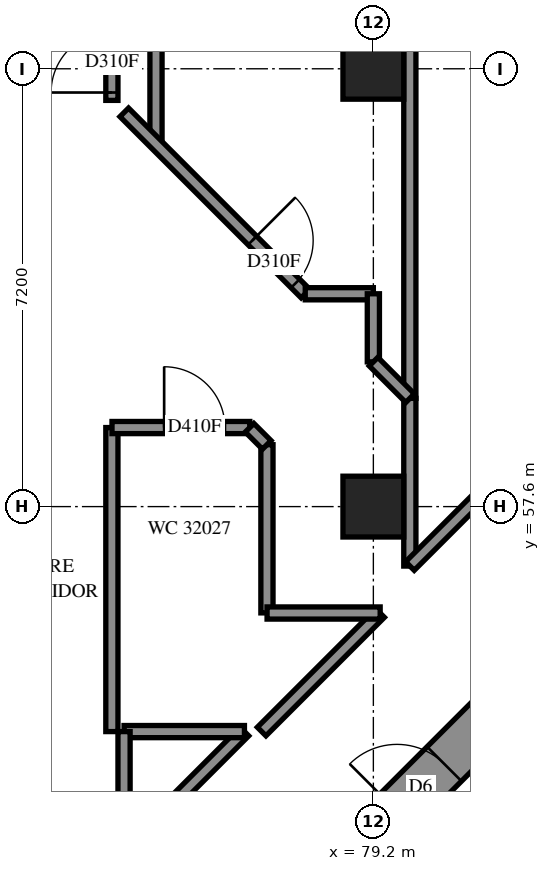
"""IFC4 building model, lengths in metres.
Left out: names, types, materials, properties, quantities, classifications, styles, units other than length and angle.
Written with IfcOpenShell. Run it as: python <this file> out.ifc"""

import sys

from ifc_helpers import new_model, si_unit, direction, frame, frame_2d, origin, origin_2d, place, context, subcontext, project, spatial, rectangle, extrude, element, fill, save


model = new_model("IFC4")
c1 = context("Model", 3, precision=1e-05, world=origin(), true_north=direction((0.0, 1.0)))
c2 = subcontext(c1, "Body", "Model", "MODEL_VIEW")
j1 = project(units=[si_unit("LENGTHUNIT", "METRE"), si_unit("PLANEANGLEUNIT", "RADIAN")], contexts=[c1])
p1 = place(None, origin())
s1 = spatial("IfcSite", under=j1, at=p1, CompositionType="ELEMENT")
p2 = place(p1, origin())
s2 = spatial("IfcBuilding", under=s1, at=p2, CompositionType="ELEMENT")
p3 = place(p2, frame((0.0, 0.0, 118.6)))
s3 = spatial("IfcBuildingStorey", under=s2, at=p3, CompositionType="ELEMENT", Elevation=118.6)
for number, where, z_axis, x_axis in (
    (1, (79.2, 57.6, 0.0), (0.0, 0.0, 1.0), (1.0, 0.0, 0.0)),
    (2, (79.2, 64.8, 0.0), (0.0, 0.0, 1.0), (1.0, 0.0, 0.0)),
):
    element("IfcColumn", number, at=place(p3, frame(where, z_axis=z_axis, x_axis=x_axis)), inside=s3, PredefinedType="COLUMN", context=c2, shape_type="SweptSolid", body=[
        extrude(rectangle(XDim=1.0, YDim=1.0, at=origin_2d()), origin(), (0.0, 0.0, 1.0), 3.1),
    ])
p4 = place(p3, frame((76.372, 49.373, -0.3), z_axis=(0.0, 0.0, 1.0), x_axis=(0.7071067812, 0.7071067812, 0.0)))
e3 = element("IfcWall", 3, at=p4, inside=s3, PredefinedType="SHEAR", context=c2, shape_type="SweptSolid", body=[
    extrude(rectangle(XDim=14.4, YDim=0.8, at=frame_2d((7.2, 0.0))), origin(), (0.0, 0.0, 1.0), 2.7),
])
p5 = place(p4, frame((4.55, 0.0, 0.3)))
e4 = element("IfcOpeningElement", 4, at=p5, cuts=e3, PredefinedType="OPENING", context=c2, shape_type="SweptSolid", body=[
    extrude(rectangle(XDim=1.1, YDim=2.1, at=frame_2d((0.55, 1.05))), frame((0.0, 0.41, 0.0), z_axis=(0.0, -1.0, 0.0), x_axis=(1.0, 0.0, 0.0)), (0.0, 0.0, 1.0), 0.82),
])
p6 = place(p4, frame((11.35, 0.0, 0.3)))
e5 = element("IfcOpeningElement", 5, at=p6, cuts=e3, PredefinedType="OPENING", context=c2, shape_type="SweptSolid", body=[
    extrude(rectangle(XDim=1.1, YDim=2.1, at=frame_2d((0.55, 1.05))), frame((0.0, 0.41, 0.0), z_axis=(0.0, -1.0, 0.0), x_axis=(1.0, 0.0, 0.0)), (0.0, 0.0, 1.0), 0.82),
])
p7 = place(p3, frame((79.8, 59.38, 0.0), z_axis=(0.0, 0.0, 1.0), x_axis=(0.0, 1.0, 0.0)))
e6 = element("IfcWall", 6, at=p7, inside=s3, PredefinedType="PARTITIONING", context=c2, shape_type="SweptSolid", body=[
    extrude(rectangle(XDim=13.62, YDim=0.2, at=frame_2d((6.81, 0.0))), origin(), (0.0, 0.0, 1.0), 3.1),
])
p8 = place(p3, frame((75.625, 63.562, 0.0), z_axis=(0.0, 0.0, 1.0), x_axis=(0.0, 1.0, 0.0)))
e7 = element("IfcWall", 7, at=p8, inside=s3, PredefinedType="PARTITIONING", context=c2, shape_type="SweptSolid", body=[
    extrude(rectangle(XDim=9.208, YDim=0.2, at=frame_2d((4.604, 0.0))), origin(), (0.0, 0.0, 1.0), 3.1),
])
p9 = place(p3, frame((74.9, 53.9, 0.0), z_axis=(0.0, 0.0, 1.0), x_axis=(0.0, 1.0, 0.0)))
e8 = element("IfcWall", 8, at=p9, inside=s3, PredefinedType="PARTITIONING", context=c2, shape_type="SweptSolid", body=[
    extrude(rectangle(XDim=5.0, YDim=0.2, at=frame_2d((2.5, 0.0))), origin(), (0.0, 0.0, 1.0), 3.1),
])
p10 = place(p3, frame((75.103, 64.083, 0.0), z_axis=(0.0, 0.0, 1.0), x_axis=(0.7071067812, -0.7071067812, 0.0)))
e9 = element("IfcWall", 9, at=p10, inside=s3, PredefinedType="PARTITIONING", context=c2, shape_type="SweptSolid", body=[
    extrude(rectangle(XDim=4.214, YDim=0.2, at=frame_2d((2.107, 0.0))), origin(), (0.0, 0.0, 1.0), 3.1),
])
p11 = place(p10, frame((2.979, 0.0, 0.0)))
e10 = element("IfcOpeningElement", 10, at=p11, cuts=e9, PredefinedType="OPENING", context=c2, shape_type="SweptSolid", body=[
    extrude(rectangle(XDim=1.0, YDim=2.1, at=frame_2d((0.5, 1.05))), frame((0.0, 0.11, 0.0), z_axis=(0.0, -1.0, 0.0), x_axis=(1.0, 0.0, 0.0)), (0.0, 0.0, 1.0), 0.22),
])
p12 = place(p3, frame((74.9, 64.28, 0.0), z_axis=(0.0, 0.0, 1.0), x_axis=(0.0, 1.0, 0.0)))
e11 = element("IfcWall", 11, at=p12, inside=s3, PredefinedType="PARTITIONING", context=c2, shape_type="SweptSolid", body=[
    extrude(rectangle(XDim=3.42, YDim=0.2, at=frame_2d((1.71, 0.0))), origin(), (0.0, 0.0, 1.0), 3.1),
])
p13 = place(p12, frame((0.13, 0.0, 0.0)))
e12 = element("IfcOpeningElement", 12, at=p13, cuts=e11, PredefinedType="OPENING", context=c2, shape_type="SweptSolid", body=[
    extrude(rectangle(XDim=1.0, YDim=2.1, at=frame_2d((0.5, 1.05))), frame((0.0, 0.11, 0.0), z_axis=(0.0, -1.0, 0.0), x_axis=(1.0, 0.0, 0.0)), (0.0, 0.0, 1.0), 0.22),
])
p14 = place(p3, frame((75.102, 51.922, 0.0), z_axis=(0.0, 0.0, 1.0), x_axis=(0.7071067812, 0.7071067812, 0.0)))
e13 = element("IfcWall", 13, at=p14, inside=s3, PredefinedType="PARTITIONING", context=c2, shape_type="SweptSolid", body=[
    extrude(rectangle(XDim=2.797, YDim=0.2, at=frame_2d((1.399, 0.0))), origin(), (0.0, 0.0, 1.0), 3.1),
])
p15 = place(p3, frame((77.45, 55.852, 0.0), z_axis=(0.0, 0.0, 1.0), x_axis=(0.0, 1.0, 0.0)))
e14 = element("IfcWall", 14, at=p15, inside=s3, PredefinedType="PARTITIONING", context=c2, shape_type="SweptSolid", body=[
    extrude(rectangle(XDim=2.766, YDim=0.2, at=frame_2d((1.383, 0.0))), origin(), (0.0, 0.0, 1.0), 3.1),
])
p16 = place(p3, frame((79.8, 56.622, 0.0), z_axis=(0.0, 0.0, 1.0), x_axis=(0.0, 1.0, 0.0)))
e15 = element("IfcWall", 15, at=p16, inside=s3, PredefinedType="PARTITIONING", context=c2, shape_type="SweptSolid", body=[
    extrude(rectangle(XDim=2.758, YDim=0.2, at=frame_2d((1.379, 0.0))), origin(), (0.0, 0.0, 1.0), 3.1),
])
p17 = place(p3, frame((77.363, 53.901, 0.0), z_axis=(0.0, 0.0, 1.0), x_axis=(0.7071067812, 0.7071067812, 0.0)))
e16 = element("IfcWall", 16, at=p17, inside=s3, PredefinedType="PARTITIONING", context=c2, shape_type="SweptSolid", body=[
    extrude(rectangle(XDim=2.755, YDim=0.2, at=frame_2d((1.377, 0.0))), origin(), (0.0, 0.0, 1.0), 3.1),
])
p18 = place(p3, frame((74.902, 58.9, 0.0), z_axis=(0.0, 0.0, 1.0), x_axis=(1.0, 0.0, 0.0)))
e17 = element("IfcWall", 17, at=p18, inside=s3, PredefinedType="PARTITIONING", context=c2, shape_type="SweptSolid", body=[
    extrude(rectangle(XDim=2.266, YDim=0.2, at=frame_2d((1.133, 0.0))), origin(), (0.0, 0.0, 1.0), 3.1),
])
p19 = place(p18, frame((0.858, 0.0, 0.0)))
e18 = element("IfcOpeningElement", 18, at=p19, cuts=e17, PredefinedType="OPENING", context=c2, shape_type="SweptSolid", body=[
    extrude(rectangle(XDim=1.0, YDim=2.1, at=frame_2d((0.5, 1.05))), frame((0.0, 0.11, 0.0), z_axis=(0.0, -1.0, 0.0), x_axis=(1.0, 0.0, 0.0)), (0.0, 0.0, 1.0), 0.22),
])
p20 = place(p3, frame((75.1, 53.9, 0.0), z_axis=(0.0, 0.0, 1.0), x_axis=(1.0, 0.0, 0.0)))
e19 = element("IfcWall", 19, at=p20, inside=s3, PredefinedType="PARTITIONING", context=c2, shape_type="SweptSolid", body=[
    extrude(rectangle(XDim=1.98, YDim=0.2, at=frame_2d((0.99, 0.0))), origin(), (0.0, 0.0, 1.0), 3.1),
])
p21 = place(p3, frame((75.1, 51.922, 0.0), z_axis=(0.0, 0.0, 1.0), x_axis=(0.0, 1.0, 0.0)))
e20 = element("IfcWall", 20, at=p21, inside=s3, PredefinedType="PARTITIONING", context=c2, shape_type="SweptSolid", body=[
    extrude(rectangle(XDim=1.978, YDim=0.2, at=frame_2d((0.989, 0.0))), origin(), (0.0, 0.0, 1.0), 3.1),
])
p22 = place(p3, frame((79.802, 56.623, 0.0), z_axis=(0.0, 0.0, 1.0), x_axis=(0.7071067812, 0.7071067812, 0.0)))
e21 = element("IfcWall", 21, at=p22, inside=s3, PredefinedType="PARTITIONING", context=c2, shape_type="SweptSolid", body=[
    extrude(rectangle(XDim=1.949, YDim=0.2, at=frame_2d((0.974, 0.0))), origin(), (0.0, 0.0, 1.0), 3.1),
])
p23 = place(p3, frame((77.452, 55.85, 0.0), z_axis=(0.0, 0.0, 1.0), x_axis=(1.0, 0.0, 0.0)))
e22 = element("IfcWall", 22, at=p23, inside=s3, PredefinedType="PARTITIONING", context=c2, shape_type="SweptSolid", body=[
    extrude(rectangle(XDim=1.86, YDim=0.2, at=frame_2d((0.93, 0.0))), origin(), (0.0, 0.0, 1.0), 3.1),
])
for number, where, z_axis, x_axis in (
    (23, (78.08, 61.1, 0.0), (0.0, 0.0, 1.0), (1.0, 0.0, 0.0)),
    (24, (79.2, 59.98, 0.0), (0.0, 0.0, 1.0), (0.0, 1.0, 0.0)),
):
    element("IfcWall", number, at=place(p3, frame(where, z_axis=z_axis, x_axis=x_axis)), inside=s3, PredefinedType="PARTITIONING", context=c2, shape_type="SweptSolid", body=[
        extrude(rectangle(XDim=1.12, YDim=0.2, at=frame_2d((0.56, 0.0))), origin(), (0.0, 0.0, 1.0), 3.1),
    ])
p24 = place(p3, frame((79.203, 59.983, 0.0), z_axis=(0.0, 0.0, 1.0), x_axis=(0.7071067812, -0.7071067812, 0.0)))
e25 = element("IfcWall", 25, at=p24, inside=s3, PredefinedType="PARTITIONING", context=c2, shape_type="SweptSolid", body=[
    extrude(rectangle(XDim=0.849, YDim=0.2, at=frame_2d((0.424, 0.0))), origin(), (0.0, 0.0, 1.0), 3.1),
])
p25 = place(p3, frame((77.165, 58.897, 0.0), z_axis=(0.0, 0.0, 1.0), x_axis=(0.7071067812, -0.7071067812, 0.0)))
e26 = element("IfcWall", 26, at=p25, inside=s3, PredefinedType="PARTITIONING", context=c2, shape_type="SweptSolid", body=[
    extrude(rectangle(XDim=0.399, YDim=0.2, at=frame_2d((0.199, 0.0))), origin(), (0.0, 0.0, 1.0), 3.1),
])
p26 = place(p5, origin())
e27 = element("IfcDoor", 27, at=p26, inside=s3, OperationType="DOUBLE_DOOR_SINGLE_SWING", PredefinedType="DOOR", context=c2, shape_type="SweptSolid", body=[
    extrude(rectangle(XDim=1.1, YDim=2.1, at=frame_2d((0.55, 1.05))), frame((0.0, 0.025, 0.0), z_axis=(0.0, -1.0, 0.0), x_axis=(1.0, 0.0, 0.0)), (0.0, 0.0, 1.0), 0.05),
])
fill(e4, e27)
p27 = place(p19, origin())
e28 = element("IfcDoor", 28, at=p27, inside=s3, OperationType="SINGLE_SWING_RIGHT", PredefinedType="DOOR", context=c2, shape_type="SweptSolid", body=[
    extrude(rectangle(XDim=1.0, YDim=2.1, at=frame_2d((0.5, 1.05))), frame((0.0, 0.025, 0.0), z_axis=(0.0, -1.0, 0.0), x_axis=(1.0, 0.0, 0.0)), (0.0, 0.0, 1.0), 0.05),
])
fill(e18, e28)
p28 = place(p13, origin())
e29 = element("IfcDoor", 29, at=p28, inside=s3, OperationType="SINGLE_SWING_RIGHT", PredefinedType="DOOR", context=c2, shape_type="SweptSolid", body=[
    extrude(rectangle(XDim=1.0, YDim=2.1, at=frame_2d((0.5, 1.05))), frame((0.0, 0.025, 0.0), z_axis=(0.0, -1.0, 0.0), x_axis=(1.0, 0.0, 0.0)), (0.0, 0.0, 1.0), 0.05),
])
fill(e12, e29)
p29 = place(p11, origin())
e30 = element("IfcDoor", 30, at=p29, inside=s3, OperationType="SINGLE_SWING_LEFT", PredefinedType="DOOR", context=c2, shape_type="SweptSolid", body=[
    extrude(rectangle(XDim=1.0, YDim=2.1, at=frame_2d((0.5, 1.05))), frame((0.0, 0.025, 0.0), z_axis=(0.0, -1.0, 0.0), x_axis=(1.0, 0.0, 0.0)), (0.0, 0.0, 1.0), 0.05),
])
fill(e10, e30)
save(model, sys.argv[1])
